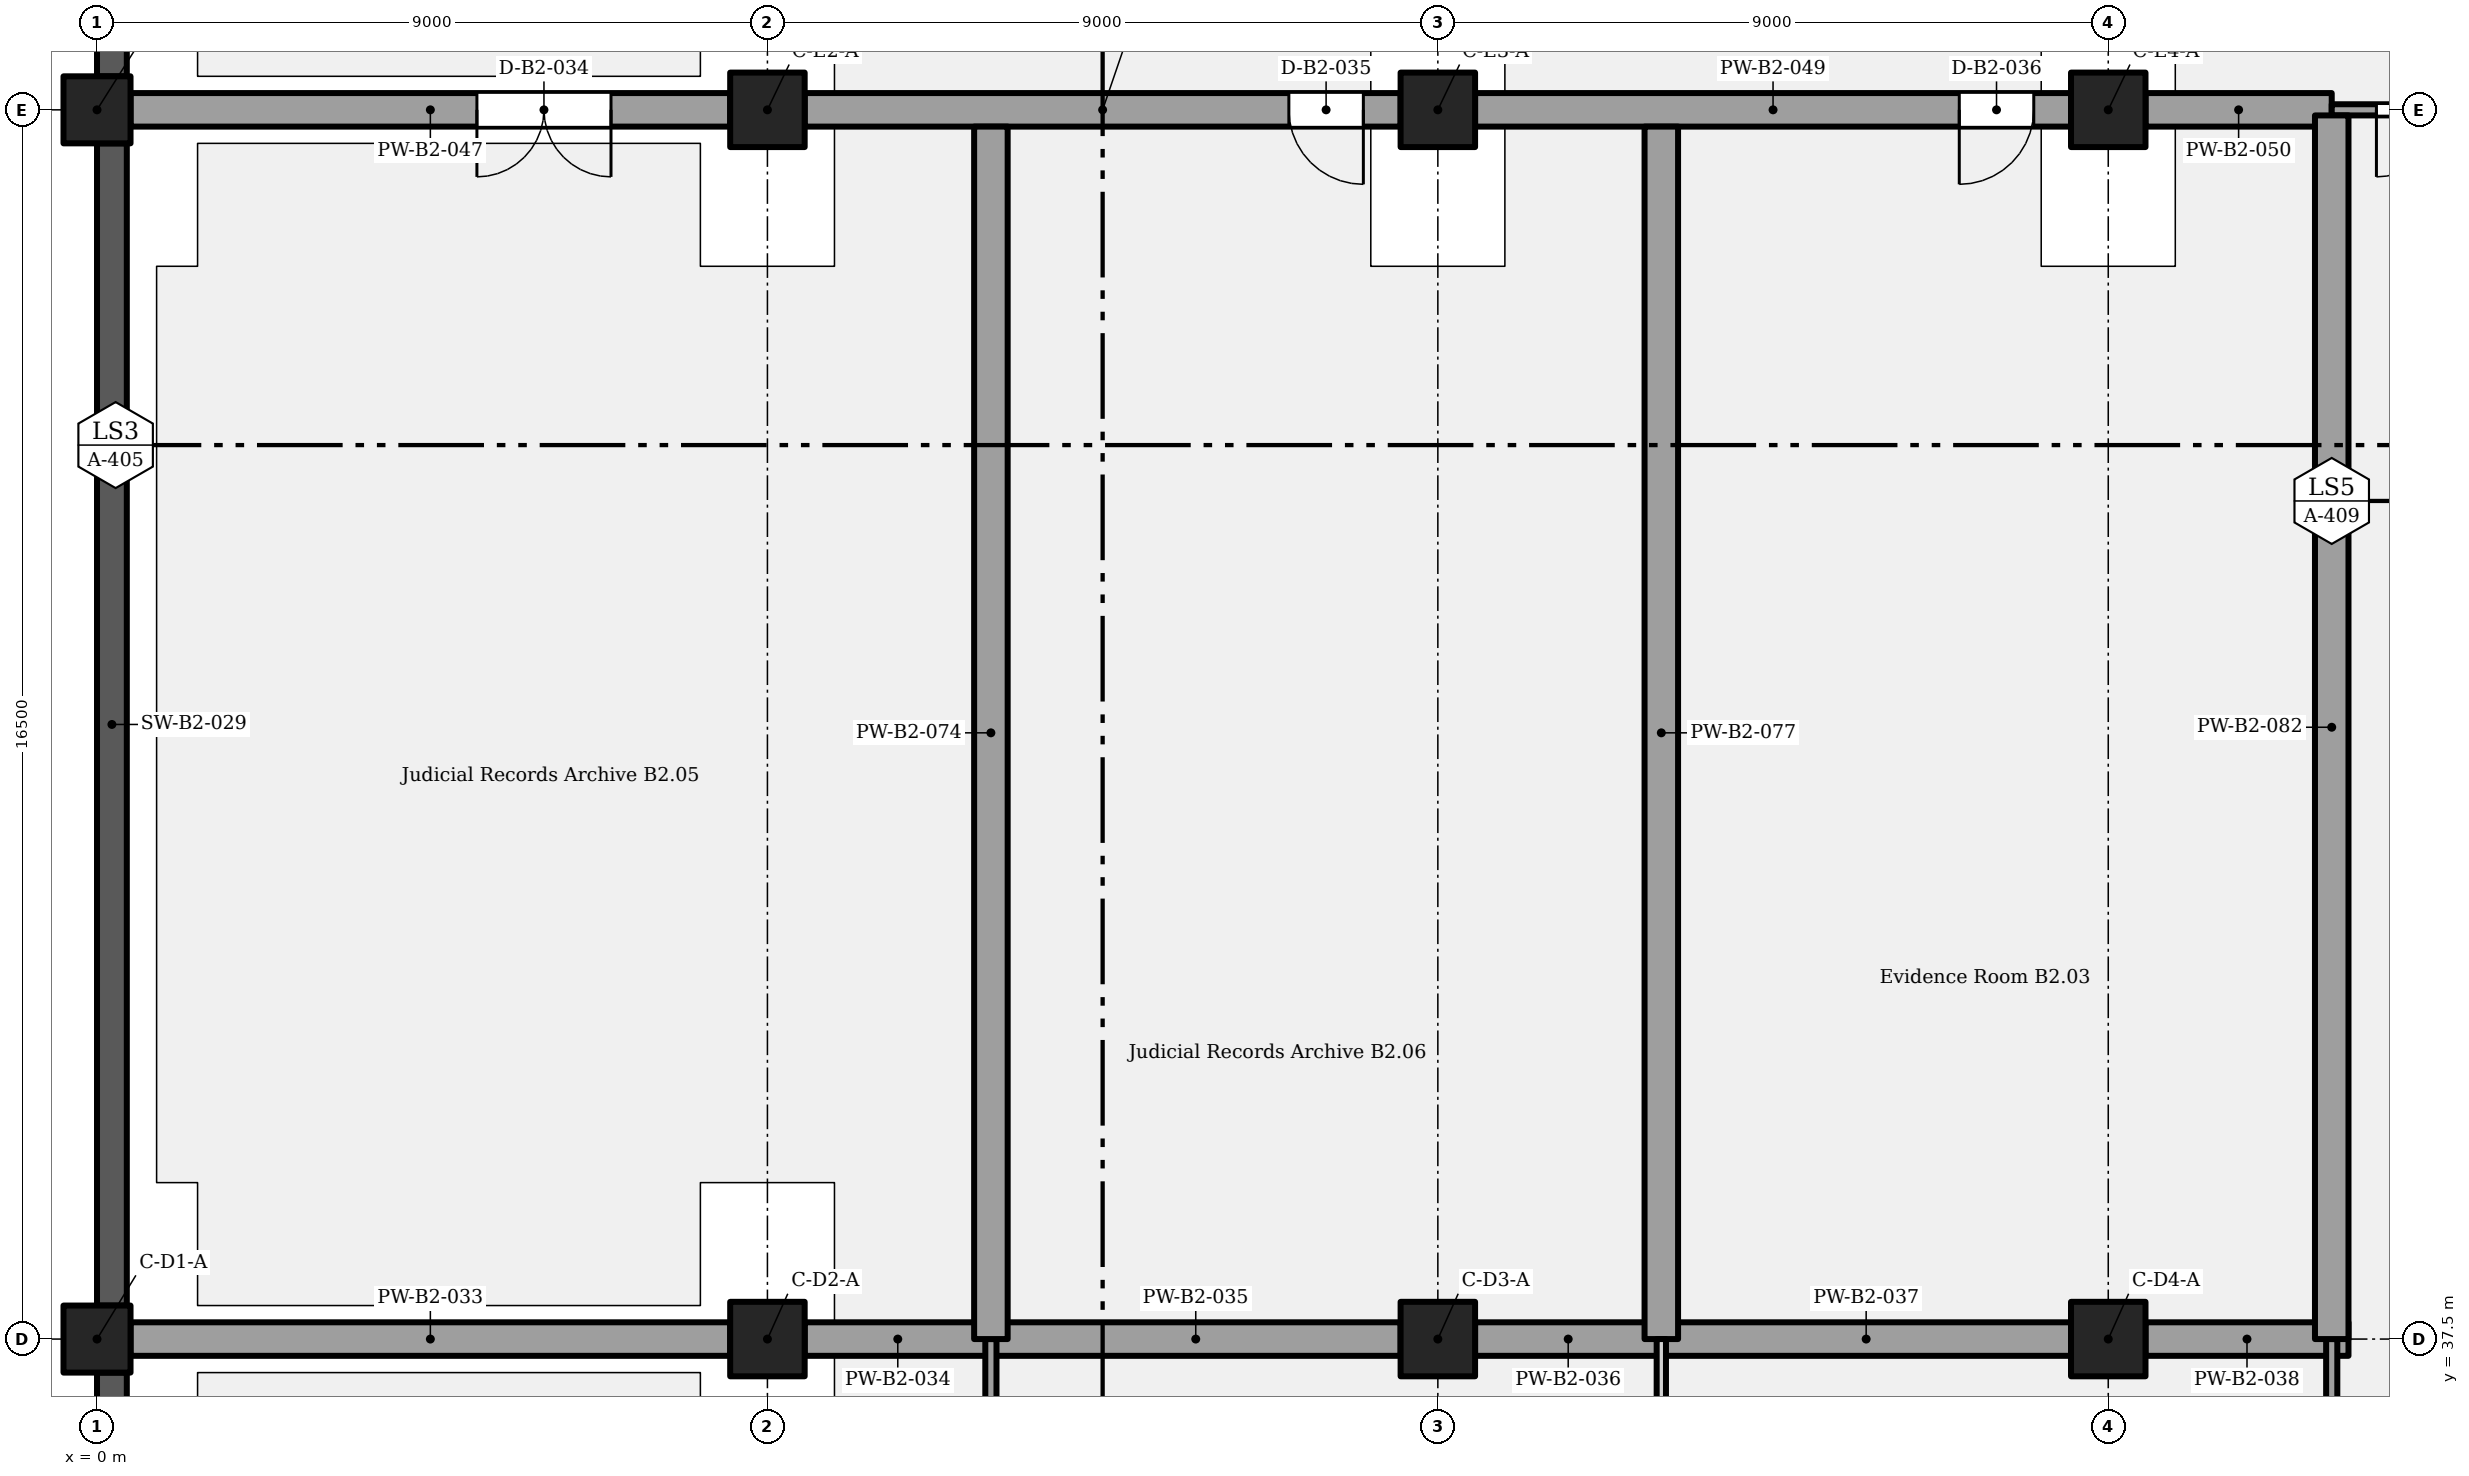
"""IFC4 building model, lengths in metres.
Left out: names, types, materials, properties, quantities, classifications, styles, units other than length and angle.
Written with IfcOpenShell. Run it as: python <this file> out.ifc"""

import sys

from ifc_helpers import new_model, si_unit, direction, frame, frame_2d, origin, origin_2d, place, context, subcontext, project, spatial, rectangle, extrude, element, fill, save


model = new_model("IFC4")
c1 = context("Model", 3, precision=1e-05, world=origin(), true_north=direction((0.0, 1.0)))
c2 = subcontext(c1, "Body", "Model", "MODEL_VIEW")
j1 = project(units=[si_unit("LENGTHUNIT", "METRE"), si_unit("PLANEANGLEUNIT", "RADIAN")], contexts=[c1])
p1 = place(None, origin())
s1 = spatial("IfcSite", under=j1, at=p1, CompositionType="ELEMENT")
p2 = place(p1, origin())
s2 = spatial("IfcBuilding", under=s1, at=p2, CompositionType="ELEMENT")
p3 = place(p2, frame((0.0, 0.0, -8.4)))
s3 = spatial("IfcBuildingStorey", under=s2, at=p3, CompositionType="ELEMENT", Elevation=-8.4)
p4 = place(p3, frame((0.0, 37.5, 0.0), z_axis=(0.0, 0.0, 1.0), x_axis=(1.0, 0.0, 0.0)))
e1 = element("IfcColumn", 1, at=p4, inside=s3, PredefinedType="COLUMN", context=c2, shape_type="SweptSolid", body=[
    extrude(rectangle(XDim=0.9, YDim=0.9, at=origin_2d()), origin(), (0.0, 0.0, 1.0), 4.2),
])
for number, where, z_axis, x_axis in (
    (2, (9.0, 37.5, 0.0), (0.0, 0.0, 1.0), (1.0, 0.0, 0.0)),
    (3, (18.0, 37.5, 0.0), (0.0, 0.0, 1.0), (1.0, 0.0, 0.0)),
    (4, (27.0, 37.5, 0.0), (0.0, 0.0, 1.0), (1.0, 0.0, 0.0)),
):
    element("IfcColumn", number, at=place(p3, frame(where, z_axis=z_axis, x_axis=x_axis)), inside=s3, PredefinedType="COLUMN", context=c2, shape_type="SweptSolid", body=[
        extrude(rectangle(XDim=1.0, YDim=1.0, at=origin_2d()), origin(), (0.0, 0.0, 1.0), 4.2),
    ])
p5 = place(p3, frame((0.0, 54.0, 0.0), z_axis=(0.0, 0.0, 1.0), x_axis=(1.0, 0.0, 0.0)))
e5 = element("IfcColumn", 5, at=p5, inside=s3, PredefinedType="COLUMN", context=c2, shape_type="SweptSolid", body=[
    extrude(rectangle(XDim=0.9, YDim=0.9, at=origin_2d()), origin(), (0.0, 0.0, 1.0), 4.2),
])
for number, where, z_axis, x_axis in (
    (6, (9.0, 54.0, 0.0), (0.0, 0.0, 1.0), (1.0, 0.0, 0.0)),
    (7, (18.0, 54.0, 0.0), (0.0, 0.0, 1.0), (1.0, 0.0, 0.0)),
    (8, (27.0, 54.0, 0.0), (0.0, 0.0, 1.0), (1.0, 0.0, 0.0)),
):
    element("IfcColumn", number, at=place(p3, frame(where, z_axis=z_axis, x_axis=x_axis)), inside=s3, PredefinedType="COLUMN", context=c2, shape_type="SweptSolid", body=[
        extrude(rectangle(XDim=1.0, YDim=1.0, at=origin_2d()), origin(), (0.0, 0.0, 1.0), 4.2),
    ])
p6 = place(p3, frame((0.2, 28.95, 0.0), z_axis=(0.0, 0.0, 1.0), x_axis=(0.0, 1.0, 0.0)))
e9 = element("IfcWall", 9, at=p6, inside=s3, PredefinedType="SOLIDWALL", context=c2, shape_type="SweptSolid", body=[
    extrude(rectangle(XDim=8.1, YDim=0.4, at=frame_2d((4.05, 0.0))), origin(), (0.0, 0.0, 1.0), 3.8),
])
p7 = place(p3, frame((0.2, 37.95, 0.0), z_axis=(0.0, 0.0, 1.0), x_axis=(0.0, 1.0, 0.0)))
e10 = element("IfcWall", 10, at=p7, inside=s3, PredefinedType="SOLIDWALL", context=c2, shape_type="SweptSolid", body=[
    extrude(rectangle(XDim=15.6, YDim=0.4, at=frame_2d((7.8, 0.0))), origin(), (0.0, 0.0, 1.0), 3.8),
])
p8 = place(p3, frame((0.2, 54.45, 0.0), z_axis=(0.0, 0.0, 1.0), x_axis=(0.0, 1.0, 0.0)))
e11 = element("IfcWall", 11, at=p8, inside=s3, PredefinedType="SOLIDWALL", context=c2, shape_type="SweptSolid", body=[
    extrude(rectangle(XDim=11.1, YDim=0.4, at=frame_2d((5.55, 0.0))), origin(), (0.0, 0.0, 1.0), 3.8),
])
p9 = place(p3, frame((0.45, 37.5, 0.0), z_axis=(0.0, 0.0, 1.0), x_axis=(1.0, 0.0, 0.0)))
e12 = element("IfcWall", 12, at=p9, inside=s3, PredefinedType="PARTITIONING", context=c2, shape_type="SweptSolid", body=[
    extrude(rectangle(XDim=8.05, YDim=0.45, at=frame_2d((4.025, 0.0))), origin(), (0.0, 0.0, 1.0), 3.05),
])
p10 = place(p3, frame((9.5, 37.5, 0.0), z_axis=(0.0, 0.0, 1.0), x_axis=(1.0, 0.0, 0.0)))
e13 = element("IfcWall", 13, at=p10, inside=s3, PredefinedType="PARTITIONING", context=c2, shape_type="SweptSolid", body=[
    extrude(rectangle(XDim=2.5, YDim=0.45, at=frame_2d((1.25, 0.0))), origin(), (0.0, 0.0, 1.0), 3.05),
])
p11 = place(p3, frame((12.0, 37.5, 0.0), z_axis=(0.0, 0.0, 1.0), x_axis=(1.0, 0.0, 0.0)))
e14 = element("IfcWall", 14, at=p11, inside=s3, PredefinedType="PARTITIONING", context=c2, shape_type="SweptSolid", body=[
    extrude(rectangle(XDim=5.5, YDim=0.45, at=frame_2d((2.75, 0.0))), origin(), (0.0, 0.0, 1.0), 3.05),
])
p12 = place(p3, frame((18.5, 37.5, 0.0), z_axis=(0.0, 0.0, 1.0), x_axis=(1.0, 0.0, 0.0)))
e15 = element("IfcWall", 15, at=p12, inside=s3, PredefinedType="PARTITIONING", context=c2, shape_type="SweptSolid", body=[
    extrude(rectangle(XDim=2.5, YDim=0.45, at=frame_2d((1.25, 0.0))), origin(), (0.0, 0.0, 1.0), 3.05),
])
p13 = place(p3, frame((21.0, 37.5, 0.0), z_axis=(0.0, 0.0, 1.0), x_axis=(1.0, 0.0, 0.0)))
e16 = element("IfcWall", 16, at=p13, inside=s3, PredefinedType="PARTITIONING", context=c2, shape_type="SweptSolid", body=[
    extrude(rectangle(XDim=5.5, YDim=0.45, at=frame_2d((2.75, 0.0))), origin(), (0.0, 0.0, 1.0), 3.05),
])
p14 = place(p3, frame((27.5, 37.5, 0.0), z_axis=(0.0, 0.0, 1.0), x_axis=(1.0, 0.0, 0.0)))
e17 = element("IfcWall", 17, at=p14, inside=s3, PredefinedType="PARTITIONING", context=c2, shape_type="SweptSolid", body=[
    extrude(rectangle(XDim=2.725, YDim=0.45, at=frame_2d((1.363, 0.0))), origin(), (0.0, 0.0, 1.0), 3.05),
])
p15 = place(p3, frame((0.45, 54.0, 0.0), z_axis=(0.0, 0.0, 1.0), x_axis=(1.0, 0.0, 0.0)))
e18 = element("IfcWall", 18, at=p15, inside=s3, PredefinedType="PARTITIONING", context=c2, shape_type="SweptSolid", body=[
    extrude(rectangle(XDim=8.05, YDim=0.45, at=frame_2d((4.025, 0.0))), origin(), (0.0, 0.0, 1.0), 3.05),
])
p16 = place(p15, frame((6.45, 0.0, 0.0), z_axis=(0.0, 0.0, 1.0), x_axis=(-1.0, 0.0, 0.0)))
e19 = element("IfcOpeningElement", 19, at=p16, cuts=e18, PredefinedType="OPENING", context=c2, shape_type="SweptSolid", body=[
    extrude(rectangle(XDim=1.8, YDim=2.4, at=frame_2d((0.9, 1.2))), frame((0.0, 0.235, 0.0), z_axis=(0.0, -1.0, 0.0), x_axis=(1.0, 0.0, 0.0)), (0.0, 0.0, 1.0), 0.47),
])
p17 = place(p3, frame((9.5, 54.0, 0.0), z_axis=(0.0, 0.0, 1.0), x_axis=(1.0, 0.0, 0.0)))
e20 = element("IfcWall", 20, at=p17, inside=s3, PredefinedType="PARTITIONING", context=c2, shape_type="SweptSolid", body=[
    extrude(rectangle(XDim=8.0, YDim=0.45, at=frame_2d((4.0, 0.0))), origin(), (0.0, 0.0, 1.0), 3.05),
])
p18 = place(p17, frame((7.5, 0.0, 0.0), z_axis=(0.0, 0.0, 1.0), x_axis=(-1.0, 0.0, 0.0)))
e21 = element("IfcOpeningElement", 21, at=p18, cuts=e20, PredefinedType="OPENING", context=c2, shape_type="SweptSolid", body=[
    extrude(rectangle(XDim=1.0, YDim=2.1, at=frame_2d((0.5, 1.05))), frame((0.0, 0.235, 0.0), z_axis=(0.0, -1.0, 0.0), x_axis=(1.0, 0.0, 0.0)), (0.0, 0.0, 1.0), 0.47),
])
p19 = place(p3, frame((18.5, 54.0, 0.0), z_axis=(0.0, 0.0, 1.0), x_axis=(1.0, 0.0, 0.0)))
e22 = element("IfcWall", 22, at=p19, inside=s3, PredefinedType="PARTITIONING", context=c2, shape_type="SweptSolid", body=[
    extrude(rectangle(XDim=8.0, YDim=0.45, at=frame_2d((4.0, 0.0))), origin(), (0.0, 0.0, 1.0), 3.05),
])
p20 = place(p19, frame((7.5, 0.0, 0.0), z_axis=(0.0, 0.0, 1.0), x_axis=(-1.0, 0.0, 0.0)))
e23 = element("IfcOpeningElement", 23, at=p20, cuts=e22, PredefinedType="OPENING", context=c2, shape_type="SweptSolid", body=[
    extrude(rectangle(XDim=1.0, YDim=2.1, at=frame_2d((0.5, 1.05))), frame((0.0, 0.235, 0.0), z_axis=(0.0, -1.0, 0.0), x_axis=(1.0, 0.0, 0.0)), (0.0, 0.0, 1.0), 0.47),
])
p21 = place(p3, frame((27.5, 54.0, 0.0), z_axis=(0.0, 0.0, 1.0), x_axis=(1.0, 0.0, 0.0)))
e24 = element("IfcWall", 24, at=p21, inside=s3, PredefinedType="PARTITIONING", context=c2, shape_type="SweptSolid", body=[
    extrude(rectangle(XDim=2.5, YDim=0.45, at=frame_2d((1.25, 0.0))), origin(), (0.0, 0.0, 1.0), 3.05),
])
p22 = place(p3, frame((30.0, 54.0, 0.0), z_axis=(0.0, 0.0, 1.0), x_axis=(1.0, 0.0, 0.0)))
e25 = element("IfcWall", 25, at=p22, inside=s3, PredefinedType="PARTITIONING", context=c2, shape_type="SweptSolid", body=[
    extrude(rectangle(XDim=3.0, YDim=0.15, at=frame_2d((1.5, 0.0))), origin(), (0.0, 0.0, 1.0), 3.05),
])
p23 = place(p22, frame((2.4, 0.0, 0.0), z_axis=(0.0, 0.0, 1.0), x_axis=(-1.0, 0.0, 0.0)))
e26 = element("IfcOpeningElement", 26, at=p23, cuts=e25, PredefinedType="OPENING", context=c2, shape_type="SweptSolid", body=[
    extrude(rectangle(XDim=1.8, YDim=2.1, at=frame_2d((0.9, 1.05))), frame((0.0, 0.085, 0.0), z_axis=(0.0, -1.0, 0.0), x_axis=(1.0, 0.0, 0.0)), (0.0, 0.0, 1.0), 0.17),
])
p24 = place(p3, frame((12.0, 31.575, 0.0), z_axis=(0.0, 0.0, 1.0), x_axis=(0.0, 1.0, 0.0)))
e27 = element("IfcWall", 27, at=p24, inside=s3, PredefinedType="PARTITIONING", context=c2, shape_type="SweptSolid", body=[
    extrude(rectangle(XDim=5.925, YDim=0.15, at=frame_2d((2.962, 0.0))), origin(), (0.0, 0.0, 1.0), 3.8),
])
p25 = place(p3, frame((12.0, 37.5, 0.0), z_axis=(0.0, 0.0, 1.0), x_axis=(0.0, 1.0, 0.0)))
e28 = element("IfcWall", 28, at=p25, inside=s3, PredefinedType="PARTITIONING", context=c2, shape_type="SweptSolid", body=[
    extrude(rectangle(XDim=16.275, YDim=0.45, at=frame_2d((8.137, 0.0))), origin(), (0.0, 0.0, 1.0), 3.8),
])
p26 = place(p3, frame((21.0, 31.575, 0.0), z_axis=(0.0, 0.0, 1.0), x_axis=(0.0, 1.0, 0.0)))
e29 = element("IfcWall", 29, at=p26, inside=s3, PredefinedType="PARTITIONING", context=c2, shape_type="SweptSolid", body=[
    extrude(rectangle(XDim=5.925, YDim=0.125, at=frame_2d((2.962, 0.0))), origin(), (0.0, 0.0, 1.0), 3.8),
])
p27 = place(p3, frame((21.0, 37.5, 0.0), z_axis=(0.0, 0.0, 1.0), x_axis=(0.0, 1.0, 0.0)))
e30 = element("IfcWall", 30, at=p27, inside=s3, PredefinedType="PARTITIONING", context=c2, shape_type="SweptSolid", body=[
    extrude(rectangle(XDim=16.275, YDim=0.45, at=frame_2d((8.137, 0.0))), origin(), (0.0, 0.0, 1.0), 3.8),
])
p28 = place(p3, frame((30.0, 28.5, 0.0), z_axis=(0.0, 0.0, 1.0), x_axis=(0.0, 1.0, 0.0)))
e31 = element("IfcWall", 31, at=p28, inside=s3, PredefinedType="PARTITIONING", context=c2, shape_type="SweptSolid", body=[
    extrude(rectangle(XDim=9.0, YDim=0.15, at=frame_2d((4.5, 0.0))), origin(), (0.0, 0.0, 1.0), 3.8),
])
p29 = place(p28, frame((2.4, 0.0, 0.0), z_axis=(0.0, 0.0, 1.0), x_axis=(-1.0, 0.0, 0.0)))
e32 = element("IfcOpeningElement", 32, at=p29, cuts=e31, PredefinedType="OPENING", context=c2, shape_type="SweptSolid", body=[
    extrude(rectangle(XDim=1.8, YDim=2.1, at=frame_2d((0.9, 1.05))), frame((0.0, 0.085, 0.0), z_axis=(0.0, -1.0, 0.0), x_axis=(1.0, 0.0, 0.0)), (0.0, 0.0, 1.0), 0.17),
])
p30 = place(p3, frame((30.0, 37.5, 0.0), z_axis=(0.0, 0.0, 1.0), x_axis=(0.0, 1.0, 0.0)))
e33 = element("IfcWall", 33, at=p30, inside=s3, PredefinedType="PARTITIONING", context=c2, shape_type="SweptSolid", body=[
    extrude(rectangle(XDim=16.425, YDim=0.45, at=frame_2d((8.212, 0.0))), origin(), (0.0, 0.0, 1.0), 3.8),
])
p31 = place(p23, origin())
e34 = element("IfcDoor", 34, at=p31, inside=s3, OperationType="DOUBLE_DOOR_SINGLE_SWING", PredefinedType="DOOR", context=c2, shape_type="SweptSolid", body=[
    extrude(rectangle(XDim=1.8, YDim=2.1, at=frame_2d((0.9, 1.05))), frame((0.0, 0.025, 0.0), z_axis=(0.0, -1.0, 0.0), x_axis=(1.0, 0.0, 0.0)), (0.0, 0.0, 1.0), 0.05),
])
fill(e26, e34)
p32 = place(p16, origin())
e35 = element("IfcDoor", 35, at=p32, inside=s3, OperationType="DOUBLE_DOOR_SINGLE_SWING", PredefinedType="DOOR", context=c2, shape_type="SweptSolid", body=[
    extrude(rectangle(XDim=1.8, YDim=2.4, at=frame_2d((0.9, 1.2))), frame((0.0, 0.025, 0.0), z_axis=(0.0, -1.0, 0.0), x_axis=(1.0, 0.0, 0.0)), (0.0, 0.0, 1.0), 0.05),
])
fill(e19, e35)
p33 = place(p18, origin())
e36 = element("IfcDoor", 36, at=p33, inside=s3, OperationType="SINGLE_SWING_LEFT", PredefinedType="DOOR", context=c2, shape_type="SweptSolid", body=[
    extrude(rectangle(XDim=1.0, YDim=2.1, at=frame_2d((0.5, 1.05))), frame((0.0, 0.025, 0.0), z_axis=(0.0, -1.0, 0.0), x_axis=(1.0, 0.0, 0.0)), (0.0, 0.0, 1.0), 0.05),
])
fill(e21, e36)
p34 = place(p20, origin())
e37 = element("IfcDoor", 37, at=p34, inside=s3, OperationType="SINGLE_SWING_RIGHT", PredefinedType="DOOR", context=c2, shape_type="SweptSolid", body=[
    extrude(rectangle(XDim=1.0, YDim=2.1, at=frame_2d((0.5, 1.05))), frame((0.0, 0.025, 0.0), z_axis=(0.0, -1.0, 0.0), x_axis=(1.0, 0.0, 0.0)), (0.0, 0.0, 1.0), 0.05),
])
fill(e23, e37)
save(model, sys.argv[1])
